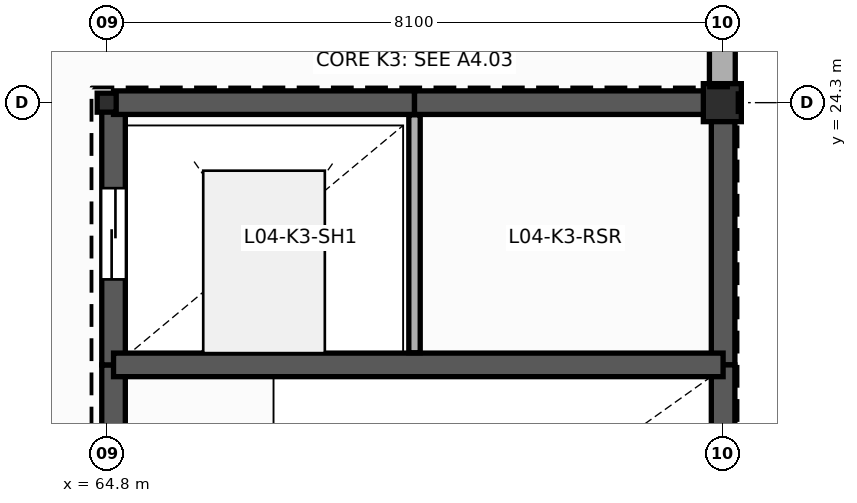
"""IFC4 building model, lengths in metres.
Left out: names, types, materials, properties, quantities, classifications, styles, units other than length and angle.
Written with IfcOpenShell. Run it as: python <this file> out.ifc"""

import sys

from ifc_helpers import new_model, si_unit, direction, frame, frame_2d, origin, origin_2d, place, context, subcontext, project, spatial, rectangle, hollow_rectangle, extrude, element, fill, save


model = new_model("IFC4")
c1 = context("Model", 3, precision=1e-05, world=origin(), true_north=direction((0.0, 1.0)))
c2 = subcontext(c1, "Body", "Model", "MODEL_VIEW")
j1 = project(units=[si_unit("LENGTHUNIT", "METRE"), si_unit("PLANEANGLEUNIT", "RADIAN")], contexts=[c1])
p1 = place(None, origin())
s1 = spatial("IfcSite", under=j1, at=p1, CompositionType="ELEMENT")
p2 = place(p1, origin())
s2 = spatial("IfcBuilding", under=s1, at=p2, CompositionType="ELEMENT")
p3 = place(p2, frame((0.0, 0.0, 19.2)))
s3 = spatial("IfcBuildingStorey", under=s2, at=p3, CompositionType="ELEMENT", Elevation=19.2)
p4 = place(p3, frame((64.8, 24.3, 0.0), z_axis=(0.0, 0.0, 1.0), x_axis=(1.0, 0.0, 0.0)))
e1 = element("IfcColumn", 1, at=p4, inside=s3, PredefinedType="COLUMN", context=c2, shape_type="SweptSolid", body=[
    extrude(hollow_rectangle(XDim=0.25, YDim=0.25, WallThickness=0.012, InnerFilletRadius=0.012, OuterFilletRadius=0.025, at=origin_2d()), origin(), (0.0, 0.0, 1.0), 4.2),
])
p5 = place(p3, frame((72.9, 24.3, 0.0), z_axis=(0.0, 0.0, 1.0), x_axis=(1.0, 0.0, 0.0)))
e2 = element("IfcColumn", 2, at=p5, inside=s3, PredefinedType="COLUMN", context=c2, shape_type="SweptSolid", body=[
    extrude(rectangle(XDim=0.5, YDim=0.5, at=origin_2d()), origin(), (0.0, 0.0, 1.0), 4.2),
])
p6 = place(p3, frame((72.9, 24.55, 0.0), z_axis=(0.0, 0.0, 1.0), x_axis=(0.0, 1.0, 0.0)))
e3 = element("IfcWall", 3, at=p6, inside=s3, PredefinedType="SOLIDWALL", context=c2, shape_type="SweptSolid", body=[
    extrude(rectangle(XDim=7.6, YDim=0.34, at=frame_2d((3.8, 0.0))), origin(), (0.0, 0.0, 1.0), 3.627),
])
p7 = place(p3, frame((64.89, 16.45, 0.0), z_axis=(0.0, 0.0, 1.0), x_axis=(0.0, 1.0, 0.0)))
e4 = element("IfcWall", 4, at=p7, inside=s3, PredefinedType="SHEAR", context=c2, shape_type="SweptSolid", body=[
    extrude(rectangle(XDim=4.4, YDim=0.31, at=frame_2d((2.2, 0.0))), origin(), (0.0, 0.0, 1.0), 4.2),
])
p8 = place(p7, frame((1.35, 0.0, 0.0)))
e5 = element("IfcOpeningElement", 5, at=p8, cuts=e4, PredefinedType="OPENING", context=c2, shape_type="SweptSolid", body=[
    extrude(rectangle(XDim=1.2, YDim=2.25, at=frame_2d((0.6, 1.125))), frame((0.0, 0.165, 0.0), z_axis=(0.0, -1.0, 0.0), x_axis=(1.0, 0.0, 0.0)), (0.0, 0.0, 1.0), 0.33),
])
p9 = place(p3, frame((64.89, 20.85, 0.0), z_axis=(0.0, 0.0, 1.0), x_axis=(0.0, 1.0, 0.0)))
e6 = element("IfcWall", 6, at=p9, inside=s3, PredefinedType="SHEAR", context=c2, shape_type="SweptSolid", body=[
    extrude(rectangle(XDim=3.45, YDim=0.31, at=frame_2d((1.725, 0.0))), origin(), (0.0, 0.0, 1.0), 4.2),
])
p10 = place(p9, frame((1.125, 0.0, 0.0)))
e7 = element("IfcOpeningElement", 7, at=p10, cuts=e6, PredefinedType="OPENING", context=c2, shape_type="SweptSolid", body=[
    extrude(rectangle(XDim=1.2, YDim=2.2, at=frame_2d((0.6, 1.1))), frame((0.0, 0.165, 0.0), z_axis=(0.0, -1.0, 0.0), x_axis=(1.0, 0.0, 0.0)), (0.0, 0.0, 1.0), 0.33),
])
p11 = place(p3, frame((64.89, 24.3, 0.0), z_axis=(0.0, 0.0, 1.0), x_axis=(1.0, 0.0, 0.0)))
e8 = element("IfcWall", 8, at=p11, inside=s3, PredefinedType="SHEAR", context=c2, shape_type="SweptSolid", body=[
    extrude(rectangle(XDim=3.96, YDim=0.31, at=frame_2d((1.98, 0.0))), origin(), (0.0, 0.0, 1.0), 4.2),
])
p12 = place(p3, frame((68.85, 24.3, 0.0), z_axis=(0.0, 0.0, 1.0), x_axis=(1.0, 0.0, 0.0)))
e9 = element("IfcWall", 9, at=p12, inside=s3, PredefinedType="SHEAR", context=c2, shape_type="SweptSolid", body=[
    extrude(rectangle(XDim=4.06, YDim=0.31, at=frame_2d((2.03, 0.0))), origin(), (0.0, 0.0, 1.0), 4.2),
])
p13 = place(p3, frame((72.91, 24.3, 0.0), z_axis=(0.0, 0.0, 1.0), x_axis=(0.0, -1.0, 0.0)))
e10 = element("IfcWall", 10, at=p13, inside=s3, PredefinedType="SHEAR", context=c2, shape_type="SweptSolid", body=[
    extrude(rectangle(XDim=3.45, YDim=0.31, at=frame_2d((1.725, 0.0))), origin(), (0.0, 0.0, 1.0), 4.2),
])
p14 = place(p3, frame((72.91, 20.85, 0.0), z_axis=(0.0, 0.0, 1.0), x_axis=(0.0, -1.0, 0.0)))
e11 = element("IfcWall", 11, at=p14, inside=s3, PredefinedType="SHEAR", context=c2, shape_type="SweptSolid", body=[
    extrude(rectangle(XDim=4.4, YDim=0.31, at=frame_2d((2.2, 0.0))), origin(), (0.0, 0.0, 1.0), 4.2),
])
p15 = place(p3, frame((64.89, 20.85, 0.0), z_axis=(0.0, 0.0, 1.0), x_axis=(1.0, 0.0, 0.0)))
e12 = element("IfcWall", 12, at=p15, inside=s3, PredefinedType="SHEAR", context=c2, shape_type="SweptSolid", body=[
    extrude(rectangle(XDim=8.02, YDim=0.31, at=frame_2d((4.01, 0.0))), origin(), (0.0, 0.0, 1.0), 4.2),
])
p16 = place(p3, frame((68.85, 21.01, 0.0), z_axis=(0.0, 0.0, 1.0), x_axis=(0.0, 1.0, 0.0)))
e13 = element("IfcWall", 13, at=p16, inside=s3, PredefinedType="PLUMBINGWALL", context=c2, shape_type="SweptSolid", body=[
    extrude(rectangle(XDim=3.13, YDim=0.15, at=frame_2d((1.565, 0.0))), origin(), (0.0, 0.0, 1.0), 3.85),
])
p17 = place(p10, origin())
e14 = element("IfcDoor", 14, at=p17, inside=s3, OperationType="SLIDING_TO_LEFT", PredefinedType="DOOR", context=c2, shape_type="SweptSolid", body=[
    extrude(rectangle(XDim=1.2, YDim=2.2, at=frame_2d((0.6, 1.1))), frame((0.0, 0.025, 0.0), z_axis=(0.0, -1.0, 0.0), x_axis=(1.0, 0.0, 0.0)), (0.0, 0.0, 1.0), 0.05),
])
fill(e7, e14)
save(model, sys.argv[1])
